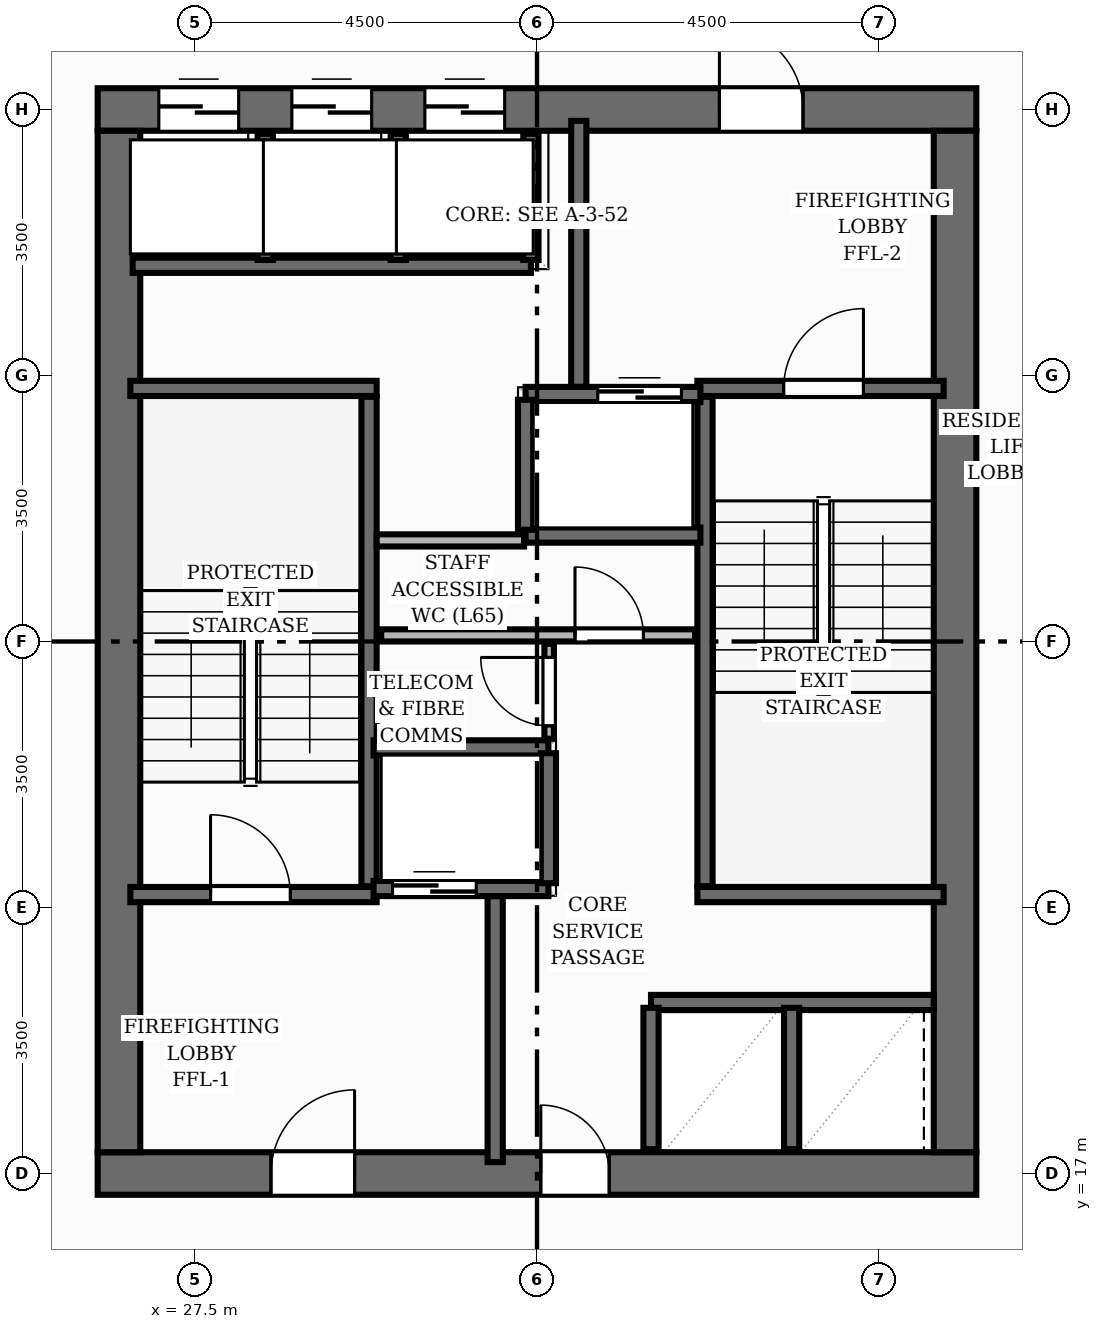
"""IFC4 building model, lengths in metres.
Left out: names, types, materials, properties, quantities, classifications, styles, units other than length and angle.
Written with IfcOpenShell. Run it as: python <this file> out.ifc"""

import sys

from ifc_helpers import new_model, si_unit, direction, frame, frame_2d, origin, place, context, subcontext, project, spatial, rectangle, extrude, element, fill, save


model = new_model("IFC4")
c1 = context("Model", 3, precision=1e-05, world=origin(), true_north=direction((0.0, 1.0)))
c2 = subcontext(c1, "Body", "Model", "MODEL_VIEW")
j1 = project(units=[si_unit("LENGTHUNIT", "METRE"), si_unit("PLANEANGLEUNIT", "RADIAN")], contexts=[c1])
p1 = place(None, origin())
s1 = spatial("IfcSite", under=j1, at=p1, CompositionType="ELEMENT")
p2 = place(p1, origin())
s2 = spatial("IfcBuilding", under=s1, at=p2, CompositionType="ELEMENT")
p3 = place(p2, frame((0.0, 0.0, 217.44)))
s3 = spatial("IfcBuildingStorey", under=s2, at=p3, CompositionType="ELEMENT", Elevation=217.44)
p4 = place(p3, frame((26.22, 17.0, 0.0), z_axis=(0.0, 0.0, 1.0), x_axis=(1.0, 0.0, 0.0)))
e1 = element("IfcWall", 1, at=p4, inside=s3, PredefinedType="SHEAR", context=c2, shape_type="SweptSolid", body=[
    extrude(rectangle(XDim=11.56, YDim=0.56, at=frame_2d((5.78, 0.0))), origin(), (0.0, 0.0, 1.0), 3.2),
])
p5 = place(p4, frame((2.28, 0.0, 0.0)))
e2 = element("IfcOpeningElement", 2, at=p5, cuts=e1, PredefinedType="OPENING", context=c2, shape_type="SweptSolid", body=[
    extrude(rectangle(XDim=1.1, YDim=2.15, at=frame_2d((0.55, 1.075))), frame((0.0, 0.29, 0.0), z_axis=(0.0, -1.0, 0.0), x_axis=(1.0, 0.0, 0.0)), (0.0, 0.0, 1.0), 0.58),
])
p6 = place(p4, frame((5.83, 0.0, 0.0)))
e3 = element("IfcOpeningElement", 3, at=p6, cuts=e1, PredefinedType="OPENING", context=c2, shape_type="SweptSolid", body=[
    extrude(rectangle(XDim=0.9, YDim=2.1, at=frame_2d((0.45, 1.05))), frame((0.0, 0.29, 0.0), z_axis=(0.0, -1.0, 0.0), x_axis=(1.0, 0.0, 0.0)), (0.0, 0.0, 1.0), 0.58),
])
p7 = place(p3, frame((26.22, 31.0, 0.0), z_axis=(0.0, 0.0, 1.0), x_axis=(1.0, 0.0, 0.0)))
e4 = element("IfcWall", 4, at=p7, inside=s3, PredefinedType="SHEAR", context=c2, shape_type="SweptSolid", body=[
    extrude(rectangle(XDim=11.56, YDim=0.56, at=frame_2d((5.78, 0.0))), origin(), (0.0, 0.0, 1.0), 3.2),
])
p8 = place(p7, frame((8.18, 0.0, 0.0)))
e5 = element("IfcOpeningElement", 5, at=p8, cuts=e4, PredefinedType="OPENING", context=c2, shape_type="SweptSolid", body=[
    extrude(rectangle(XDim=1.1, YDim=2.15, at=frame_2d((0.55, 1.075))), frame((0.0, 0.29, 0.0), z_axis=(0.0, -1.0, 0.0), x_axis=(1.0, 0.0, 0.0)), (0.0, 0.0, 1.0), 0.58),
])
p9 = place(p7, frame((0.805, 0.0, 0.0)))
e6 = element("IfcOpeningElement", 6, at=p9, cuts=e4, PredefinedType="OPENING", context=c2, shape_type="SweptSolid", body=[
    extrude(rectangle(XDim=1.05, YDim=2.15, at=frame_2d((0.525, 1.075))), frame((0.0, 0.29, 0.0), z_axis=(0.0, -1.0, 0.0), x_axis=(1.0, 0.0, 0.0)), (0.0, 0.0, 1.0), 0.58),
])
p10 = place(p7, frame((2.555, 0.0, 0.0)))
e7 = element("IfcOpeningElement", 7, at=p10, cuts=e4, PredefinedType="OPENING", context=c2, shape_type="SweptSolid", body=[
    extrude(rectangle(XDim=1.05, YDim=2.15, at=frame_2d((0.525, 1.075))), frame((0.0, 0.29, 0.0), z_axis=(0.0, -1.0, 0.0), x_axis=(1.0, 0.0, 0.0)), (0.0, 0.0, 1.0), 0.58),
])
p11 = place(p7, frame((4.305, 0.0, 0.0)))
e8 = element("IfcOpeningElement", 8, at=p11, cuts=e4, PredefinedType="OPENING", context=c2, shape_type="SweptSolid", body=[
    extrude(rectangle(XDim=1.05, YDim=2.15, at=frame_2d((0.525, 1.075))), frame((0.0, 0.29, 0.0), z_axis=(0.0, -1.0, 0.0), x_axis=(1.0, 0.0, 0.0)), (0.0, 0.0, 1.0), 0.58),
])
for number, where, z_axis, x_axis in (
    (9, (26.5, 17.28, 0.0), (0.0, 0.0, 1.0), (0.0, 1.0, 0.0)),
    (10, (37.5, 17.28, 0.0), (0.0, 0.0, 1.0), (0.0, 1.0, 0.0)),
):
    element("IfcWall", number, at=place(p3, frame(where, z_axis=z_axis, x_axis=x_axis)), inside=s3, PredefinedType="SHEAR", context=c2, shape_type="SweptSolid", body=[
        extrude(rectangle(XDim=13.44, YDim=0.56, at=frame_2d((6.72, 0.0))), origin(), (0.0, 0.0, 1.0), 3.2),
    ])
p12 = place(p3, frame((29.79, 20.78, 0.0), z_axis=(0.0, 0.0, 1.0), x_axis=(0.0, 1.0, 0.0)))
e11 = element("IfcWall", 11, at=p12, inside=s3, PredefinedType="SHEAR", context=c2, shape_type="SweptSolid", body=[
    extrude(rectangle(XDim=6.44, YDim=0.2, at=frame_2d((3.22, 0.0))), origin(), (0.0, 0.0, 1.0), 3.2),
])
p13 = place(p3, frame((26.65, 27.33, 0.0), z_axis=(0.0, 0.0, 1.0), x_axis=(1.0, 0.0, 0.0)))
e12 = element("IfcWall", 12, at=p13, inside=s3, PredefinedType="SHEAR", context=c2, shape_type="SweptSolid", body=[
    extrude(rectangle(XDim=3.24, YDim=0.2, at=frame_2d((1.62, 0.0))), origin(), (0.0, 0.0, 1.0), 3.2),
])
p14 = place(p3, frame((26.65, 20.67, 0.0), z_axis=(0.0, 0.0, 1.0), x_axis=(1.0, 0.0, 0.0)))
e13 = element("IfcWall", 13, at=p14, inside=s3, PredefinedType="SHEAR", context=c2, shape_type="SweptSolid", body=[
    extrude(rectangle(XDim=3.24, YDim=0.2, at=frame_2d((1.62, 0.0))), origin(), (0.0, 0.0, 1.0), 3.2),
])
p15 = place(p14, frame((1.055, 0.0, 0.0)))
e14 = element("IfcOpeningElement", 14, at=p15, cuts=e13, PredefinedType="OPENING", context=c2, shape_type="SweptSolid", body=[
    extrude(rectangle(XDim=1.05, YDim=2.15, at=frame_2d((0.525, 1.075))), frame((0.0, 0.11, 0.0), z_axis=(0.0, -1.0, 0.0), x_axis=(1.0, 0.0, 0.0)), (0.0, 0.0, 1.0), 0.22),
])
p16 = place(p3, frame((34.21, 20.78, 0.0), z_axis=(0.0, 0.0, 1.0), x_axis=(0.0, 1.0, 0.0)))
e15 = element("IfcWall", 15, at=p16, inside=s3, PredefinedType="SHEAR", context=c2, shape_type="SweptSolid", body=[
    extrude(rectangle(XDim=6.44, YDim=0.2, at=frame_2d((3.22, 0.0))), origin(), (0.0, 0.0, 1.0), 3.2),
])
p17 = place(p3, frame((34.11, 20.67, 0.0), z_axis=(0.0, 0.0, 1.0), x_axis=(1.0, 0.0, 0.0)))
e16 = element("IfcWall", 16, at=p17, inside=s3, PredefinedType="SHEAR", context=c2, shape_type="SweptSolid", body=[
    extrude(rectangle(XDim=3.24, YDim=0.2, at=frame_2d((1.62, 0.0))), origin(), (0.0, 0.0, 1.0), 3.2),
])
p18 = place(p3, frame((34.11, 27.33, 0.0), z_axis=(0.0, 0.0, 1.0), x_axis=(1.0, 0.0, 0.0)))
e17 = element("IfcWall", 17, at=p18, inside=s3, PredefinedType="SHEAR", context=c2, shape_type="SweptSolid", body=[
    extrude(rectangle(XDim=3.24, YDim=0.2, at=frame_2d((1.62, 0.0))), origin(), (0.0, 0.0, 1.0), 3.2),
])
p19 = place(p18, frame((1.135, 0.0, 0.0)))
e18 = element("IfcOpeningElement", 18, at=p19, cuts=e17, PredefinedType="OPENING", context=c2, shape_type="SweptSolid", body=[
    extrude(rectangle(XDim=1.05, YDim=2.15, at=frame_2d((0.525, 1.075))), frame((0.0, 0.11, 0.0), z_axis=(0.0, -1.0, 0.0), x_axis=(1.0, 0.0, 0.0)), (0.0, 0.0, 1.0), 0.22),
])
for number, where, z_axis, x_axis in (
    (19, (31.45, 17.15, 0.0), (0.0, 0.0, 1.0), (0.0, 1.0, 0.0)),
    (20, (32.55, 27.35, 0.0), (0.0, 0.0, 1.0), (0.0, 1.0, 0.0)),
):
    element("IfcWall", number, at=place(p3, frame(where, z_axis=z_axis, x_axis=x_axis)), inside=s3, PredefinedType="SHEAR", context=c2, shape_type="SweptSolid", body=[
        extrude(rectangle(XDim=3.5, YDim=0.2, at=frame_2d((1.75, 0.0))), origin(), (0.0, 0.0, 1.0), 3.2),
    ])
p20 = place(p3, frame((29.85, 20.75, 0.0), z_axis=(0.0, 0.0, 1.0), x_axis=(1.0, 0.0, 0.0)))
e21 = element("IfcWall", 21, at=p20, inside=s3, PredefinedType="SHEAR", context=c2, shape_type="SweptSolid", body=[
    extrude(rectangle(XDim=2.3, YDim=0.2, at=frame_2d((1.15, 0.0))), origin(), (0.0, 0.0, 1.0), 3.2),
])
p21 = place(p20, frame((0.25, 0.0, 0.0)))
e22 = element("IfcOpeningElement", 22, at=p21, cuts=e21, PredefinedType="OPENING", context=c2, shape_type="SweptSolid", body=[
    extrude(rectangle(XDim=1.1, YDim=2.15, at=frame_2d((0.55, 1.075))), frame((0.0, 0.11, 0.0), z_axis=(0.0, -1.0, 0.0), x_axis=(1.0, 0.0, 0.0)), (0.0, 0.0, 1.0), 0.22),
])
p22 = place(p3, frame((29.85, 22.6, 0.0), z_axis=(0.0, 0.0, 1.0), x_axis=(1.0, 0.0, 0.0)))
e23 = element("IfcWall", 23, at=p22, inside=s3, PredefinedType="SHEAR", context=c2, shape_type="SweptSolid", body=[
    extrude(rectangle(XDim=2.3, YDim=0.2, at=frame_2d((1.15, 0.0))), origin(), (0.0, 0.0, 1.0), 3.2),
])
p23 = place(p3, frame((32.15, 20.82, 0.0), z_axis=(0.0, 0.0, 1.0), x_axis=(0.0, 1.0, 0.0)))
e24 = element("IfcWall", 24, at=p23, inside=s3, PredefinedType="SHEAR", context=c2, shape_type="SweptSolid", body=[
    extrude(rectangle(XDim=1.71, YDim=0.2, at=frame_2d((0.855, 0.0))), origin(), (0.0, 0.0, 1.0), 3.2),
])
p24 = place(p3, frame((31.85, 27.25, 0.0), z_axis=(0.0, 0.0, 1.0), x_axis=(1.0, 0.0, 0.0)))
e25 = element("IfcWall", 25, at=p24, inside=s3, PredefinedType="SHEAR", context=c2, shape_type="SweptSolid", body=[
    extrude(rectangle(XDim=2.3, YDim=0.2, at=frame_2d((1.15, 0.0))), origin(), (0.0, 0.0, 1.0), 3.2),
])
p25 = place(p24, frame((0.95, 0.0, 0.0)))
e26 = element("IfcOpeningElement", 26, at=p25, cuts=e25, PredefinedType="OPENING", context=c2, shape_type="SweptSolid", body=[
    extrude(rectangle(XDim=1.1, YDim=2.15, at=frame_2d((0.55, 1.075))), frame((0.0, 0.11, 0.0), z_axis=(0.0, -1.0, 0.0), x_axis=(1.0, 0.0, 0.0)), (0.0, 0.0, 1.0), 0.22),
])
p26 = place(p3, frame((31.85, 25.4, 0.0), z_axis=(0.0, 0.0, 1.0), x_axis=(1.0, 0.0, 0.0)))
e27 = element("IfcWall", 27, at=p26, inside=s3, PredefinedType="SHEAR", context=c2, shape_type="SweptSolid", body=[
    extrude(rectangle(XDim=2.3, YDim=0.2, at=frame_2d((1.15, 0.0))), origin(), (0.0, 0.0, 1.0), 3.2),
])
p27 = place(p3, frame((31.85, 25.47, 0.0), z_axis=(0.0, 0.0, 1.0), x_axis=(0.0, 1.0, 0.0)))
e28 = element("IfcWall", 28, at=p27, inside=s3, PredefinedType="SHEAR", context=c2, shape_type="SweptSolid", body=[
    extrude(rectangle(XDim=1.71, YDim=0.2, at=frame_2d((0.855, 0.0))), origin(), (0.0, 0.0, 1.0), 3.2),
])
p28 = place(p3, frame((26.68, 28.95, 0.0), z_axis=(0.0, 0.0, 1.0), x_axis=(1.0, 0.0, 0.0)))
e29 = element("IfcWall", 29, at=p28, inside=s3, PredefinedType="SHEAR", context=c2, shape_type="SweptSolid", body=[
    extrude(rectangle(XDim=5.24, YDim=0.2, at=frame_2d((2.62, 0.0))), origin(), (0.0, 0.0, 1.0), 3.2),
])
for number, where, z_axis, x_axis in (
    (30, (31.92, 29.02, 0.0), (0.0, 0.0, 1.0), (0.0, 1.0, 0.0)),
    (31, (28.425, 29.02, 0.0), (0.0, 0.0, 1.0), (0.0, 1.0, 0.0)),
    (32, (30.175, 29.02, 0.0), (0.0, 0.0, 1.0), (0.0, 1.0, 0.0)),
):
    element("IfcWall", number, at=place(p3, frame(where, z_axis=z_axis, x_axis=x_axis)), inside=s3, PredefinedType="SHEAR", context=c2, shape_type="SweptSolid", body=[
        extrude(rectangle(XDim=1.66, YDim=0.2, at=frame_2d((0.83, 0.0))), origin(), (0.0, 0.0, 1.0), 3.2),
    ])
p29 = place(p3, frame((33.5, 19.25, 0.0), z_axis=(0.0, 0.0, 1.0), x_axis=(1.0, 0.0, 0.0)))
e33 = element("IfcWall", 33, at=p29, inside=s3, PredefinedType="SHEAR", context=c2, shape_type="SweptSolid", body=[
    extrude(rectangle(XDim=3.72, YDim=0.2, at=frame_2d((1.86, 0.0))), origin(), (0.0, 0.0, 1.0), 3.2),
])
for number, where, z_axis, x_axis in (
    (34, (33.5, 17.32, 0.0), (0.0, 0.0, 1.0), (0.0, 1.0, 0.0)),
    (35, (35.35, 17.32, 0.0), (0.0, 0.0, 1.0), (0.0, 1.0, 0.0)),
):
    element("IfcWall", number, at=place(p3, frame(where, z_axis=z_axis, x_axis=x_axis)), inside=s3, PredefinedType="SHEAR", context=c2, shape_type="SweptSolid", body=[
        extrude(rectangle(XDim=1.86, YDim=0.2, at=frame_2d((0.93, 0.0))), origin(), (0.0, 0.0, 1.0), 3.2),
    ])
p30 = place(p3, frame((29.95, 24.08, 0.0), z_axis=(0.0, 0.0, 1.0), x_axis=(1.0, 0.0, 0.0)))
e36 = element("IfcWall", 36, at=p30, inside=s3, PredefinedType="PLUMBINGWALL", context=c2, shape_type="SweptSolid", body=[
    extrude(rectangle(XDim=4.13, YDim=0.16, at=frame_2d((2.065, 0.0))), origin(), (0.0, 0.0, 1.0), 2.955),
])
p31 = place(p30, frame((2.55, 0.0, 0.0)))
e37 = element("IfcOpeningElement", 37, at=p31, cuts=e36, PredefinedType="OPENING", context=c2, shape_type="SweptSolid", body=[
    extrude(rectangle(XDim=0.9, YDim=2.1, at=frame_2d((0.45, 1.05))), frame((0.0, 0.09, 0.0), z_axis=(0.0, -1.0, 0.0), x_axis=(1.0, 0.0, 0.0)), (0.0, 0.0, 1.0), 0.18),
])
p32 = place(p3, frame((32.16, 22.72, 0.0), z_axis=(0.0, 0.0, 1.0), x_axis=(0.0, 1.0, 0.0)))
e38 = element("IfcWall", 38, at=p32, inside=s3, PredefinedType="PARTITIONING", context=c2, shape_type="SweptSolid", body=[
    extrude(rectangle(XDim=1.25, YDim=0.125, at=frame_2d((0.625, 0.0))), origin(), (0.0, 0.0, 1.0), 2.955),
])
p33 = place(p32, frame((0.17, 0.0, 0.0)))
e39 = element("IfcOpeningElement", 39, at=p33, cuts=e38, PredefinedType="OPENING", context=c2, shape_type="SweptSolid", body=[
    extrude(rectangle(XDim=0.9, YDim=2.1, at=frame_2d((0.45, 1.05))), frame((0.0, 0.073, 0.0), z_axis=(0.0, -1.0, 0.0), x_axis=(1.0, 0.0, 0.0)), (0.0, 0.0, 1.0), 0.145),
])
p34 = place(p3, frame((29.89, 25.33, 0.0), z_axis=(0.0, 0.0, 1.0), x_axis=(1.0, 0.0, 0.0)))
e40 = element("IfcWall", 40, at=p34, inside=s3, PredefinedType="PLUMBINGWALL", context=c2, shape_type="SweptSolid", body=[
    extrude(rectangle(XDim=1.94, YDim=0.16, at=frame_2d((0.97, 0.0))), origin(), (0.0, 0.0, 1.0), 2.955),
])
p35 = place(p15, origin())
e41 = element("IfcDoor", 41, at=p35, inside=s3, OperationType="SINGLE_SWING_LEFT", PredefinedType="DOOR", context=c2, shape_type="SweptSolid", body=[
    extrude(rectangle(XDim=1.05, YDim=2.15, at=frame_2d((0.525, 1.075))), frame((0.0, 0.025, 0.0), z_axis=(0.0, -1.0, 0.0), x_axis=(1.0, 0.0, 0.0)), (0.0, 0.0, 1.0), 0.05),
])
fill(e14, e41)
p36 = place(p19, origin())
e42 = element("IfcDoor", 42, at=p36, inside=s3, OperationType="SINGLE_SWING_RIGHT", PredefinedType="DOOR", context=c2, shape_type="SweptSolid", body=[
    extrude(rectangle(XDim=1.05, YDim=2.15, at=frame_2d((0.525, 1.075))), frame((0.0, 0.025, 0.0), z_axis=(0.0, -1.0, 0.0), x_axis=(1.0, 0.0, 0.0)), (0.0, 0.0, 1.0), 0.05),
])
fill(e18, e42)
p37 = place(p5, origin())
e43 = element("IfcDoor", 43, at=p37, inside=s3, OperationType="SINGLE_SWING_RIGHT", PredefinedType="DOOR", context=c2, shape_type="SweptSolid", body=[
    extrude(rectangle(XDim=1.1, YDim=2.15, at=frame_2d((0.55, 1.075))), frame((0.0, 0.025, 0.0), z_axis=(0.0, -1.0, 0.0), x_axis=(1.0, 0.0, 0.0)), (0.0, 0.0, 1.0), 0.05),
])
fill(e2, e43)
p38 = place(p8, origin())
e44 = element("IfcDoor", 44, at=p38, inside=s3, OperationType="SINGLE_SWING_LEFT", PredefinedType="DOOR", context=c2, shape_type="SweptSolid", body=[
    extrude(rectangle(XDim=1.1, YDim=2.15, at=frame_2d((0.55, 1.075))), frame((0.0, 0.025, 0.0), z_axis=(0.0, -1.0, 0.0), x_axis=(1.0, 0.0, 0.0)), (0.0, 0.0, 1.0), 0.05),
])
fill(e5, e44)
p39 = place(p21, origin())
e45 = element("IfcDoor", 45, at=p39, inside=s3, OperationType="DOUBLE_DOOR_SLIDING", PredefinedType="DOOR", context=c2, shape_type="SweptSolid", body=[
    extrude(rectangle(XDim=1.1, YDim=2.15, at=frame_2d((0.55, 1.075))), frame((0.0, 0.025, 0.0), z_axis=(0.0, -1.0, 0.0), x_axis=(1.0, 0.0, 0.0)), (0.0, 0.0, 1.0), 0.05),
])
fill(e22, e45)
p40 = place(p25, origin())
e46 = element("IfcDoor", 46, at=p40, inside=s3, OperationType="DOUBLE_DOOR_SLIDING", PredefinedType="DOOR", context=c2, shape_type="SweptSolid", body=[
    extrude(rectangle(XDim=1.1, YDim=2.15, at=frame_2d((0.55, 1.075))), frame((0.0, 0.025, 0.0), z_axis=(0.0, -1.0, 0.0), x_axis=(1.0, 0.0, 0.0)), (0.0, 0.0, 1.0), 0.05),
])
fill(e26, e46)
p41 = place(p9, origin())
e47 = element("IfcDoor", 47, at=p41, inside=s3, OperationType="DOUBLE_DOOR_SLIDING", PredefinedType="DOOR", context=c2, shape_type="SweptSolid", body=[
    extrude(rectangle(XDim=1.05, YDim=2.15, at=frame_2d((0.525, 1.075))), frame((0.0, 0.025, 0.0), z_axis=(0.0, -1.0, 0.0), x_axis=(1.0, 0.0, 0.0)), (0.0, 0.0, 1.0), 0.05),
])
fill(e6, e47)
p42 = place(p10, origin())
e48 = element("IfcDoor", 48, at=p42, inside=s3, OperationType="DOUBLE_DOOR_SLIDING", PredefinedType="DOOR", context=c2, shape_type="SweptSolid", body=[
    extrude(rectangle(XDim=1.05, YDim=2.15, at=frame_2d((0.525, 1.075))), frame((0.0, 0.025, 0.0), z_axis=(0.0, -1.0, 0.0), x_axis=(1.0, 0.0, 0.0)), (0.0, 0.0, 1.0), 0.05),
])
fill(e7, e48)
p43 = place(p11, origin())
e49 = element("IfcDoor", 49, at=p43, inside=s3, OperationType="DOUBLE_DOOR_SLIDING", PredefinedType="DOOR", context=c2, shape_type="SweptSolid", body=[
    extrude(rectangle(XDim=1.05, YDim=2.15, at=frame_2d((0.525, 1.075))), frame((0.0, 0.025, 0.0), z_axis=(0.0, -1.0, 0.0), x_axis=(1.0, 0.0, 0.0)), (0.0, 0.0, 1.0), 0.05),
])
fill(e8, e49)
p44 = place(p6, origin())
e50 = element("IfcDoor", 50, at=p44, inside=s3, OperationType="SINGLE_SWING_LEFT", PredefinedType="DOOR", context=c2, shape_type="SweptSolid", body=[
    extrude(rectangle(XDim=0.9, YDim=2.1, at=frame_2d((0.45, 1.05))), frame((0.0, 0.025, 0.0), z_axis=(0.0, -1.0, 0.0), x_axis=(1.0, 0.0, 0.0)), (0.0, 0.0, 1.0), 0.05),
])
fill(e3, e50)
p45 = place(p31, origin())
e51 = element("IfcDoor", 51, at=p45, inside=s3, OperationType="SINGLE_SWING_LEFT", PredefinedType="DOOR", context=c2, shape_type="SweptSolid", body=[
    extrude(rectangle(XDim=0.9, YDim=2.1, at=frame_2d((0.45, 1.05))), frame((0.0, 0.025, 0.0), z_axis=(0.0, -1.0, 0.0), x_axis=(1.0, 0.0, 0.0)), (0.0, 0.0, 1.0), 0.05),
])
fill(e37, e51)
p46 = place(p33, origin())
e52 = element("IfcDoor", 52, at=p46, inside=s3, OperationType="SINGLE_SWING_RIGHT", PredefinedType="DOOR", context=c2, shape_type="SweptSolid", body=[
    extrude(rectangle(XDim=0.9, YDim=2.1, at=frame_2d((0.45, 1.05))), frame((0.0, 0.025, 0.0), z_axis=(0.0, -1.0, 0.0), x_axis=(1.0, 0.0, 0.0)), (0.0, 0.0, 1.0), 0.05),
])
fill(e39, e52)
save(model, sys.argv[1])
